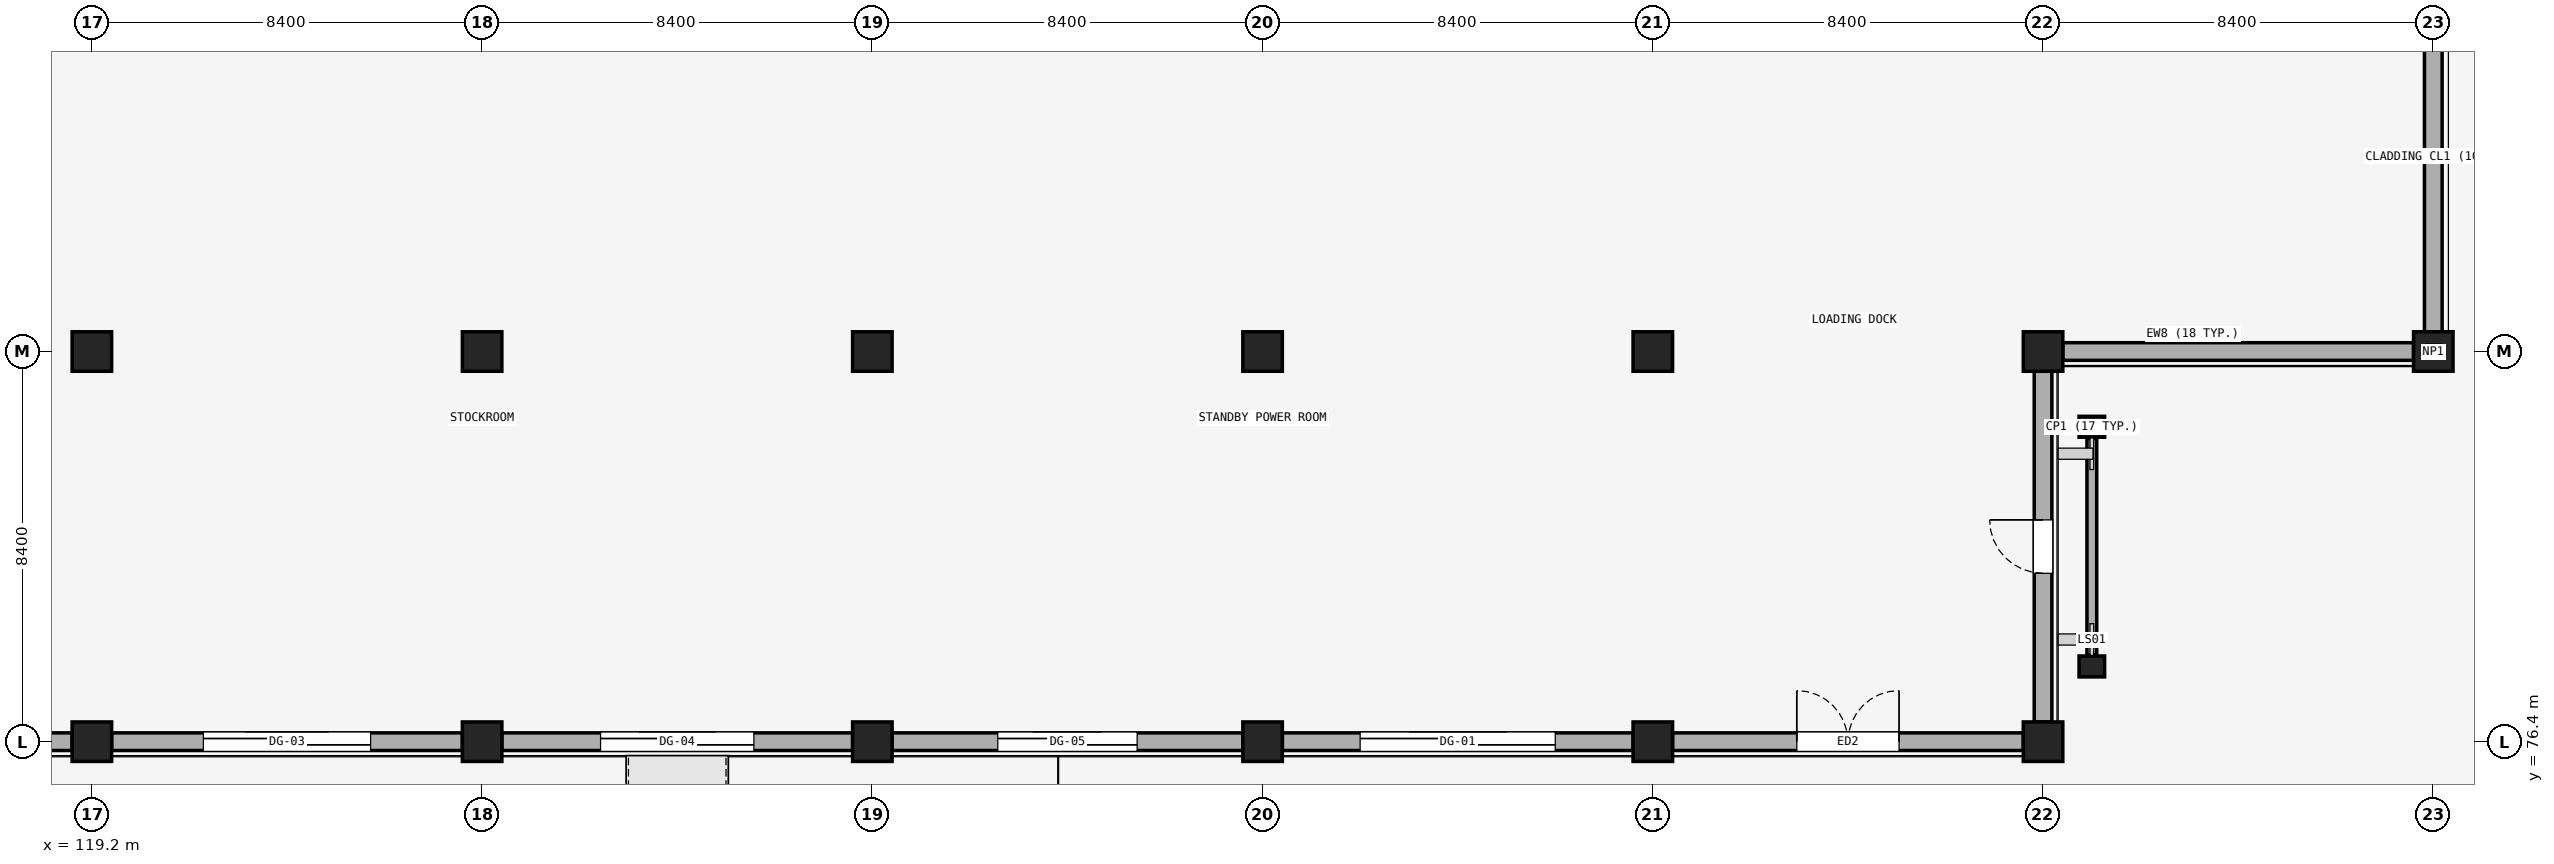
"""IFC4 building model, lengths in metres.
Left out: names, types, materials, properties, quantities, classifications, styles, units other than length and angle.
Written with IfcOpenShell. Run it as: python <this file> out.ifc"""

import sys

from ifc_helpers import new_model, si_unit, direction, frame, frame_2d, origin, origin_2d, place, context, subcontext, project, spatial, rectangle, extrude, element, fill, save


model = new_model("IFC4")
c1 = context("Model", 3, precision=1e-05, world=origin(), true_north=direction((0.0, 1.0)))
c2 = subcontext(c1, "Body", "Model", "MODEL_VIEW")
j1 = project(units=[si_unit("LENGTHUNIT", "METRE"), si_unit("PLANEANGLEUNIT", "RADIAN")], contexts=[c1])
p1 = place(None, origin())
s1 = spatial("IfcSite", under=j1, at=p1, CompositionType="ELEMENT")
p2 = place(p1, origin())
s2 = spatial("IfcBuilding", under=s1, at=p2, CompositionType="ELEMENT")
p3 = place(p2, origin())
s3 = spatial("IfcBuildingStorey", under=s2, at=p3, CompositionType="ELEMENT", Elevation=0.0)
for number, where, z_axis, x_axis in (
    (1, (119.2, 76.4, 0.0), (0.0, 0.0, 1.0), (1.0, 0.0, 0.0)),
    (2, (127.6, 76.4, 0.0), (0.0, 0.0, 1.0), (1.0, 0.0, 0.0)),
    (3, (136.0, 76.4, 0.0), (0.0, 0.0, 1.0), (1.0, 0.0, 0.0)),
    (4, (144.4, 76.4, 0.0), (0.0, 0.0, 1.0), (1.0, 0.0, 0.0)),
    (5, (152.8, 76.4, 0.0), (0.0, 0.0, 1.0), (1.0, 0.0, 0.0)),
    (6, (161.2, 76.4, 0.0), (0.0, 0.0, 1.0), (1.0, 0.0, 0.0)),
    (7, (119.2, 84.8, 0.0), (0.0, 0.0, 1.0), (1.0, 0.0, 0.0)),
    (8, (127.6, 84.8, 0.0), (0.0, 0.0, 1.0), (1.0, 0.0, 0.0)),
    (9, (136.0, 84.8, 0.0), (0.0, 0.0, 1.0), (1.0, 0.0, 0.0)),
    (10, (144.4, 84.8, 0.0), (0.0, 0.0, 1.0), (1.0, 0.0, 0.0)),
    (11, (152.8, 84.8, 0.0), (0.0, 0.0, 1.0), (1.0, 0.0, 0.0)),
    (12, (161.2, 84.8, 0.0), (0.0, 0.0, 1.0), (1.0, 0.0, 0.0)),
    (13, (169.6, 84.8, 0.0), (0.0, 0.0, 1.0), (1.0, 0.0, 0.0)),
):
    element("IfcColumn", number, at=place(p3, frame(where, z_axis=z_axis, x_axis=x_axis)), inside=s3, PredefinedType="COLUMN", context=c2, shape_type="SweptSolid", body=[
        extrude(rectangle(XDim=0.85, YDim=0.85, at=origin_2d()), origin(), (0.0, 0.0, 1.0), 5.4),
    ])
for number, where, z_axis, x_axis in (
    (14, (162.25, 78.02, 0.0), (0.0, 0.0, 1.0), (0.0, 1.0, 0.0)),
    (15, (162.25, 83.18, 0.0), (0.0, 0.0, 1.0), (0.0, 1.0, 0.0)),
):
    element("IfcColumn", number, at=place(p3, frame(where, z_axis=z_axis, x_axis=x_axis)), inside=s3, PredefinedType="PILASTER", context=c2, shape_type="SweptSolid", body=[
        extrude(rectangle(XDim=0.45, YDim=0.55, at=origin_2d()), origin(), (0.0, 0.0, 1.0), 5.4),
    ])
p4 = place(p3, frame((111.225, 76.4, 0.0), z_axis=(0.0, 0.0, 1.0), x_axis=(1.0, 0.0, 0.0)))
e16 = element("IfcWall", 16, at=p4, inside=s3, PredefinedType="SOLIDWALL", context=c2, shape_type="SweptSolid", body=[
    extrude(rectangle(XDim=7.55, YDim=0.38, at=frame_2d((3.775, 0.0))), origin(), (0.0, 0.0, 1.0), 4.35),
])
p5 = place(p4, frame((1.825, 0.0, 0.0)))
e17 = element("IfcOpeningElement", 17, at=p5, cuts=e16, PredefinedType="OPENING", context=c2, shape_type="SweptSolid", body=[
    extrude(rectangle(XDim=3.9, YDim=3.4, at=frame_2d((1.95, 1.7))), frame((0.0, 0.2, 0.0), z_axis=(0.0, -1.0, 0.0), x_axis=(1.0, 0.0, 0.0)), (0.0, 0.0, 1.0), 0.4),
])
p6 = place(p3, frame((119.625, 76.4, 0.0), z_axis=(0.0, 0.0, 1.0), x_axis=(1.0, 0.0, 0.0)))
e18 = element("IfcWall", 18, at=p6, inside=s3, PredefinedType="SOLIDWALL", context=c2, shape_type="SweptSolid", body=[
    extrude(rectangle(XDim=7.55, YDim=0.38, at=frame_2d((3.775, 0.0))), origin(), (0.0, 0.0, 1.0), 4.35),
])
p7 = place(p6, frame((1.975, 0.0, 0.0)))
e19 = element("IfcOpeningElement", 19, at=p7, cuts=e18, PredefinedType="OPENING", context=c2, shape_type="SweptSolid", body=[
    extrude(rectangle(XDim=3.6, YDim=3.3, at=frame_2d((1.8, 1.65))), frame((0.0, 0.2, 0.0), z_axis=(0.0, -1.0, 0.0), x_axis=(1.0, 0.0, 0.0)), (0.0, 0.0, 1.0), 0.4),
])
p8 = place(p3, frame((128.025, 76.4, 0.0), z_axis=(0.0, 0.0, 1.0), x_axis=(1.0, 0.0, 0.0)))
e20 = element("IfcWall", 20, at=p8, inside=s3, PredefinedType="SOLIDWALL", context=c2, shape_type="SweptSolid", body=[
    extrude(rectangle(XDim=7.55, YDim=0.38, at=frame_2d((3.775, 0.0))), origin(), (0.0, 0.0, 1.0), 4.35),
])
p9 = place(p8, frame((2.125, 0.0, 0.0)))
e21 = element("IfcOpeningElement", 21, at=p9, cuts=e20, PredefinedType="OPENING", context=c2, shape_type="SweptSolid", body=[
    extrude(rectangle(XDim=3.3, YDim=3.2, at=frame_2d((1.65, 1.6))), frame((0.0, 0.2, 0.0), z_axis=(0.0, -1.0, 0.0), x_axis=(1.0, 0.0, 0.0)), (0.0, 0.0, 1.0), 0.4),
])
p10 = place(p3, frame((136.425, 76.4, 0.0), z_axis=(0.0, 0.0, 1.0), x_axis=(1.0, 0.0, 0.0)))
e22 = element("IfcWall", 22, at=p10, inside=s3, PredefinedType="SOLIDWALL", context=c2, shape_type="SweptSolid", body=[
    extrude(rectangle(XDim=7.55, YDim=0.38, at=frame_2d((3.775, 0.0))), origin(), (0.0, 0.0, 1.0), 4.35),
])
p11 = place(p10, frame((2.275, 0.0, 0.0)))
e23 = element("IfcOpeningElement", 23, at=p11, cuts=e22, PredefinedType="OPENING", context=c2, shape_type="SweptSolid", body=[
    extrude(rectangle(XDim=3.0, YDim=3.1, at=frame_2d((1.5, 1.55))), frame((0.0, 0.2, 0.0), z_axis=(0.0, -1.0, 0.0), x_axis=(1.0, 0.0, 0.0)), (0.0, 0.0, 1.0), 0.4),
])
p12 = place(p3, frame((144.825, 76.4, 0.0), z_axis=(0.0, 0.0, 1.0), x_axis=(1.0, 0.0, 0.0)))
e24 = element("IfcWall", 24, at=p12, inside=s3, PredefinedType="SOLIDWALL", context=c2, shape_type="SweptSolid", body=[
    extrude(rectangle(XDim=7.55, YDim=0.38, at=frame_2d((3.775, 0.0))), origin(), (0.0, 0.0, 1.0), 4.35),
])
p13 = place(p12, frame((1.675, 0.0, 0.0)))
e25 = element("IfcOpeningElement", 25, at=p13, cuts=e24, PredefinedType="OPENING", context=c2, shape_type="SweptSolid", body=[
    extrude(rectangle(XDim=4.2, YDim=3.4, at=frame_2d((2.1, 1.7))), frame((0.0, 0.2, 0.0), z_axis=(0.0, -1.0, 0.0), x_axis=(1.0, 0.0, 0.0)), (0.0, 0.0, 1.0), 0.4),
])
p14 = place(p3, frame((153.225, 76.4, 0.0), z_axis=(0.0, 0.0, 1.0), x_axis=(1.0, 0.0, 0.0)))
e26 = element("IfcWall", 26, at=p14, inside=s3, PredefinedType="SOLIDWALL", context=c2, shape_type="SweptSolid", body=[
    extrude(rectangle(XDim=7.55, YDim=0.38, at=frame_2d((3.775, 0.0))), origin(), (0.0, 0.0, 1.0), 4.35),
])
p15 = place(p14, frame((2.675, 0.0, 0.0)))
e27 = element("IfcOpeningElement", 27, at=p15, cuts=e26, PredefinedType="OPENING", context=c2, shape_type="SweptSolid", body=[
    extrude(rectangle(XDim=2.2, YDim=2.55, at=frame_2d((1.1, 1.275))), frame((0.0, 0.2, 0.0), z_axis=(0.0, -1.0, 0.0), x_axis=(1.0, 0.0, 0.0)), (0.0, 0.0, 1.0), 0.4),
])
p16 = place(p3, frame((161.625, 84.8, 0.0), z_axis=(0.0, 0.0, 1.0), x_axis=(1.0, 0.0, 0.0)))
e28 = element("IfcWall", 28, at=p16, inside=s3, PredefinedType="SOLIDWALL", context=c2, shape_type="SweptSolid", body=[
    extrude(rectangle(XDim=7.55, YDim=0.38, at=frame_2d((3.775, 0.0))), origin(), (0.0, 0.0, 1.0), 4.35),
])
p17 = place(p3, frame((161.2, 76.825, 0.0), z_axis=(0.0, 0.0, 1.0), x_axis=(0.0, 1.0, 0.0)))
e29 = element("IfcWall", 29, at=p17, inside=s3, PredefinedType="SOLIDWALL", context=c2, shape_type="SweptSolid", body=[
    extrude(rectangle(XDim=7.55, YDim=0.38, at=frame_2d((3.775, 0.0))), origin(), (0.0, 0.0, 1.0), 4.35),
])
p18 = place(p17, frame((3.2, 0.0, 0.0)))
e30 = element("IfcOpeningElement", 30, at=p18, cuts=e29, PredefinedType="OPENING", context=c2, shape_type="SweptSolid", body=[
    extrude(rectangle(XDim=1.15, YDim=2.15, at=frame_2d((0.575, 1.075))), frame((0.0, 0.2, 0.0), z_axis=(0.0, -1.0, 0.0), x_axis=(1.0, 0.0, 0.0)), (0.0, 0.0, 1.0), 0.4),
])
p19 = place(p3, frame((169.6, 85.225, 0.0), z_axis=(0.0, 0.0, 1.0), x_axis=(0.0, 1.0, 0.0)))
e31 = element("IfcWall", 31, at=p19, inside=s3, PredefinedType="SOLIDWALL", context=c2, shape_type="SweptSolid", body=[
    extrude(rectangle(XDim=7.55, YDim=0.38, at=frame_2d((3.775, 0.0))), origin(), (0.0, 0.0, 1.0), 4.35),
])
p20 = place(p3, frame((162.25, 78.27, 4.78), z_axis=(0.0, 0.0, 1.0), x_axis=(0.0, 1.0, 0.0)))
e32 = element("IfcWall", 32, at=p20, inside=s3, PredefinedType="PARAPET", context=c2, shape_type="SweptSolid", body=[
    extrude(rectangle(XDim=4.66, YDim=0.21, at=frame_2d((2.33, 0.0))), origin(), (0.0, 0.0, 1.0), 0.12),
])
p21 = place(p7, origin())
e33 = element("IfcDoor", 33, at=p21, inside=s3, OperationType="ROLLINGUP", PredefinedType="GATE", context=c2, shape_type="SweptSolid", body=[
    extrude(rectangle(XDim=3.6, YDim=3.3, at=frame_2d((1.8, 1.65))), frame((0.0, 0.025, 0.0), z_axis=(0.0, -1.0, 0.0), x_axis=(1.0, 0.0, 0.0)), (0.0, 0.0, 1.0), 0.05),
])
fill(e19, e33)
p22 = place(p9, origin())
e34 = element("IfcDoor", 34, at=p22, inside=s3, OperationType="ROLLINGUP", PredefinedType="GATE", context=c2, shape_type="SweptSolid", body=[
    extrude(rectangle(XDim=3.3, YDim=3.2, at=frame_2d((1.65, 1.6))), frame((0.0, 0.025, 0.0), z_axis=(0.0, -1.0, 0.0), x_axis=(1.0, 0.0, 0.0)), (0.0, 0.0, 1.0), 0.05),
])
fill(e21, e34)
p23 = place(p11, origin())
e35 = element("IfcDoor", 35, at=p23, inside=s3, OperationType="ROLLINGUP", PredefinedType="GATE", context=c2, shape_type="SweptSolid", body=[
    extrude(rectangle(XDim=3.0, YDim=3.1, at=frame_2d((1.5, 1.55))), frame((0.0, 0.025, 0.0), z_axis=(0.0, -1.0, 0.0), x_axis=(1.0, 0.0, 0.0)), (0.0, 0.0, 1.0), 0.05),
])
fill(e23, e35)
p24 = place(p13, origin())
e36 = element("IfcDoor", 36, at=p24, inside=s3, OperationType="ROLLINGUP", PredefinedType="GATE", context=c2, shape_type="SweptSolid", body=[
    extrude(rectangle(XDim=4.2, YDim=3.4, at=frame_2d((2.1, 1.7))), frame((0.0, 0.025, 0.0), z_axis=(0.0, -1.0, 0.0), x_axis=(1.0, 0.0, 0.0)), (0.0, 0.0, 1.0), 0.05),
])
fill(e25, e36)
p25 = place(p15, origin())
e37 = element("IfcDoor", 37, at=p25, inside=s3, OperationType="DOUBLE_DOOR_SINGLE_SWING", PredefinedType="DOOR", context=c2, shape_type="SweptSolid", body=[
    extrude(rectangle(XDim=2.2, YDim=2.55, at=frame_2d((1.1, 1.275))), frame((0.0, 0.025, 0.0), z_axis=(0.0, -1.0, 0.0), x_axis=(1.0, 0.0, 0.0)), (0.0, 0.0, 1.0), 0.05),
])
fill(e27, e37)
p26 = place(p18, origin())
e38 = element("IfcDoor", 38, at=p26, inside=s3, OperationType="SINGLE_SWING_RIGHT", PredefinedType="DOOR", context=c2, shape_type="SweptSolid", body=[
    extrude(rectangle(XDim=1.15, YDim=2.15, at=frame_2d((0.575, 1.075))), frame((0.0, 0.025, 0.0), z_axis=(0.0, -1.0, 0.0), x_axis=(1.0, 0.0, 0.0)), (0.0, 0.0, 1.0), 0.05),
])
fill(e30, e38)
save(model, sys.argv[1])
